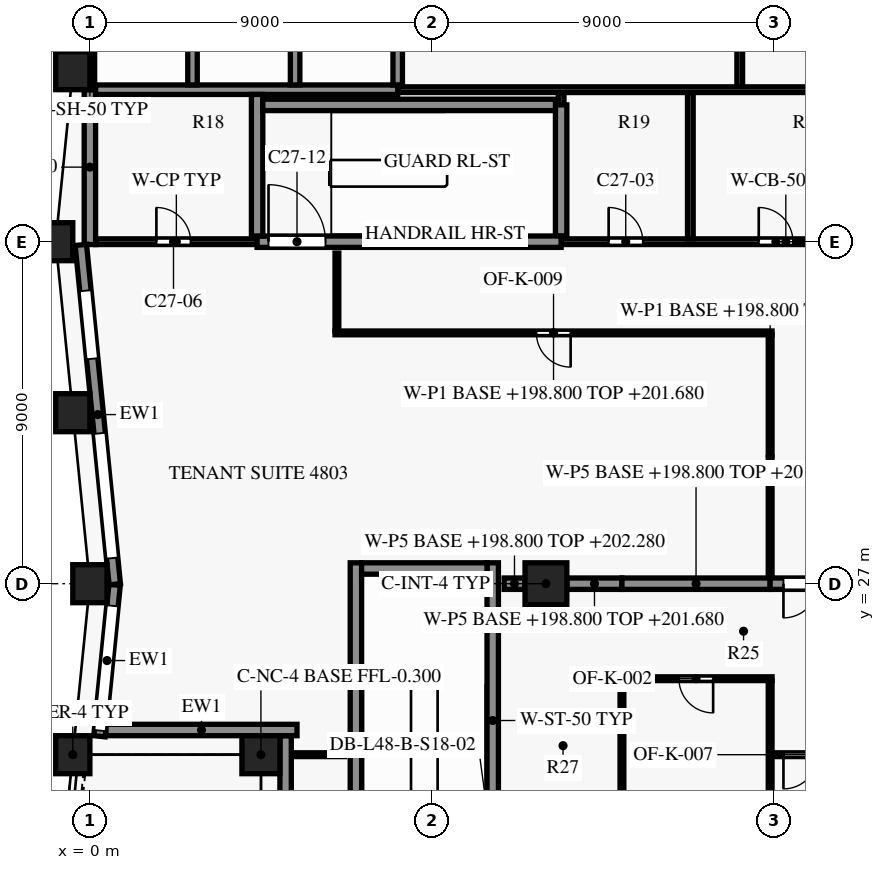
"""IFC4 building model, lengths in metres.
Left out: names, types, materials, properties, quantities, classifications, styles, units other than length and angle.
Written with IfcOpenShell. Run it as: python <this file> out.ifc"""

import sys

from ifc_helpers import new_model, si_unit, direction, frame, frame_2d, origin, origin_2d, place, context, subcontext, project, spatial, rectangle, extrude, element, fill, save


model = new_model("IFC4")
c1 = context("Model", 3, precision=1e-05, world=origin(), true_north=direction((0.0, 1.0)))
c2 = subcontext(c1, "Body", "Model", "MODEL_VIEW")
j1 = project(units=[si_unit("LENGTHUNIT", "METRE"), si_unit("PLANEANGLEUNIT", "RADIAN")], contexts=[c1])
p1 = place(None, origin())
s1 = spatial("IfcSite", under=j1, at=p1, CompositionType="ELEMENT")
p2 = place(p1, origin())
s2 = spatial("IfcBuilding", under=s1, at=p2, CompositionType="ELEMENT")
p3 = place(p2, frame((0.0, 0.0, 198.8)))
s3 = spatial("IfcBuildingStorey", under=s2, at=p3, CompositionType="ELEMENT", Elevation=198.8)
for number, where, z_axis, x_axis in (
    (1, (-0.45, 40.5, 0.0), (0.0, 0.0, 1.0), (-0.1, -0.995, 0.0)),
    (2, (-0.9, 36.0, 0.0), (0.0, 0.0, 1.0), (0.0, -1.0, 0.0)),
    (3, (-0.45, 31.5, 0.0), (0.0, 0.0, 1.0), (0.1, -0.995, 0.0)),
    (4, (0.0, 27.0, 0.0), (0.0, 0.0, 1.0), (0.0, -1.0, 0.0)),
    (5, (-0.45, 22.5, 0.0), (0.0, 0.0, 1.0), (-0.1, -0.995, 0.0)),
):
    element("IfcColumn", number, at=place(p3, frame(where, z_axis=z_axis, x_axis=x_axis)), inside=s3, PredefinedType="COLUMN", context=c2, shape_type="SweptSolid", body=[
        extrude(rectangle(XDim=0.9, YDim=1.0, at=origin_2d()), origin(), (0.0, 0.0, 1.0), 3.8),
    ])
p4 = place(p3, frame((4.5, 22.5, -0.3), z_axis=(0.0, 0.0, 1.0), x_axis=(1.0, 0.0, 0.0)))
e6 = element("IfcColumn", 6, at=p4, inside=s3, PredefinedType="COLUMN", context=c2, shape_type="SweptSolid", body=[
    extrude(rectangle(XDim=1.0, YDim=1.0, at=origin_2d()), origin(), (0.0, 0.0, 1.0), 4.1),
])
p5 = place(p3, frame((12.0, 27.0, 0.0), z_axis=(0.0, 0.0, 1.0), x_axis=(1.0, 0.0, 0.0)))
e7 = element("IfcColumn", 7, at=p5, inside=s3, PredefinedType="COLUMN", context=c2, shape_type="SweptSolid", body=[
    extrude(rectangle(XDim=1.1, YDim=1.1, at=origin_2d()), origin(), (0.0, 0.0, 1.0), 3.8),
])
p6 = place(p3, frame((0.655, 26.985, 0.0), z_axis=(0.0, 0.0, 1.0), x_axis=(-0.099509105781, 0.995036651519, 0.0)))
e8 = element("IfcWall", 8, at=p6, inside=s3, PredefinedType="SOLIDWALL", context=c2, shape_type="SweptSolid", body=[
    extrude(rectangle(XDim=8.975, YDim=0.3, at=frame_2d((4.487, 0.0))), origin(), (0.0, 0.0, 1.0), 3.15),
])
p7 = place(p6, frame((0.691, 0.0, 0.15)))
e9 = element("IfcOpeningElement", 9, at=p7, cuts=e8, PredefinedType="OPENING", context=c2, shape_type="SweptSolid", body=[
    extrude(rectangle(XDim=3.3, YDim=2.4, at=frame_2d((1.65, 1.2))), frame((0.0, 0.16, 0.0), z_axis=(0.0, -1.0, 0.0), x_axis=(1.0, 0.0, 0.0)), (0.0, 0.0, 1.0), 0.32),
])
p8 = place(p6, frame((5.964, 0.0, 0.75)))
e10 = element("IfcOpeningElement", 10, at=p8, cuts=e8, PredefinedType="OPENING", context=c2, shape_type="SweptSolid", body=[
    extrude(rectangle(XDim=1.8, YDim=1.8, at=frame_2d((0.9, 0.9))), frame((0.0, 0.16, 0.0), z_axis=(0.0, -1.0, 0.0), x_axis=(1.0, 0.0, 0.0)), (0.0, 0.0, 1.0), 0.32),
])
p9 = place(p3, frame((0.252, 22.985, 0.0), z_axis=(0.0, 0.0, 1.0), x_axis=(0.09954596771, 0.995032964435, 0.0)))
e11 = element("IfcWall", 11, at=p9, inside=s3, PredefinedType="SOLIDWALL", context=c2, shape_type="SweptSolid", body=[
    extrude(rectangle(XDim=4.005, YDim=0.3, at=frame_2d((2.002, 0.0))), origin(), (0.0, 0.0, 1.0), 3.15),
])
p10 = place(p9, frame((0.15, 0.0, 0.15)))
e12 = element("IfcOpeningElement", 12, at=p10, cuts=e11, PredefinedType="OPENING", context=c2, shape_type="SweptSolid", body=[
    extrude(rectangle(XDim=3.3, YDim=2.4, at=frame_2d((1.65, 1.2))), frame((0.0, 0.16, 0.0), z_axis=(0.0, -1.0, 0.0), x_axis=(1.0, 0.0, 0.0)), (0.0, 0.0, 1.0), 0.32),
])
p11 = place(p3, frame((5.45, 23.15, 0.0), z_axis=(0.0, 0.0, 1.0), x_axis=(-1.0, 0.0, 0.0)))
e13 = element("IfcWall", 13, at=p11, inside=s3, PredefinedType="SOLIDWALL", context=c2, shape_type="SweptSolid", body=[
    extrude(rectangle(XDim=5.026, YDim=0.3, at=frame_2d((2.513, 0.0))), origin(), (0.0, 0.0, 1.0), 3.15),
])
p12 = place(p3, frame((5.15, 18.5, 0.0), z_axis=(0.0, 0.0, 1.0), x_axis=(0.0, 1.0, 0.0)))
e14 = element("IfcWall", 14, at=p12, inside=s3, PredefinedType="SOLIDWALL", context=c2, shape_type="SweptSolid", body=[
    extrude(rectangle(XDim=4.5, YDim=0.3, at=frame_2d((2.25, 0.0))), origin(), (0.0, 0.0, 1.0), 3.15),
])
p13 = place(p3, frame((7.15, 27.4, 0.0), z_axis=(0.0, 0.0, 1.0), x_axis=(1.0, 0.0, 0.0)))
e15 = element("IfcWall", 15, at=p13, inside=s3, PredefinedType="SHEAR", context=c2, shape_type="SweptSolid", body=[
    extrude(rectangle(XDim=3.3, YDim=0.3, at=frame_2d((1.65, 0.0))), origin(), (0.0, 0.0, 1.0), 3.5),
])
p14 = place(p3, frame((0.15, 36.0, 0.0), z_axis=(0.0, 0.0, 1.0), x_axis=(1.0, 0.0, 0.0)))
e16 = element("IfcWall", 16, at=p14, inside=s3, PredefinedType="PARTITIONING", context=c2, shape_type="SweptSolid", body=[
    extrude(rectangle(XDim=4.25, YDim=0.15, at=frame_2d((2.125, 0.0))), origin(), (0.0, 0.0, 1.0), 3.5),
])
p15 = place(p14, frame((1.6, 0.0, 0.0)))
e17 = element("IfcOpeningElement", 17, at=p15, cuts=e16, PredefinedType="OPENING", context=c2, shape_type="SweptSolid", body=[
    extrude(rectangle(XDim=0.9, YDim=2.1, at=frame_2d((0.45, 1.05))), frame((0.0, 0.085, 0.0), z_axis=(0.0, -1.0, 0.0), x_axis=(1.0, 0.0, 0.0)), (0.0, 0.0, 1.0), 0.17),
])
p16 = place(p3, frame((12.4, 36.0, 0.0), z_axis=(0.0, 0.0, 1.0), x_axis=(1.0, 0.0, 0.0)))
e18 = element("IfcWall", 18, at=p16, inside=s3, PredefinedType="SHEAR", context=c2, shape_type="SweptSolid", body=[
    extrude(rectangle(XDim=11.825, YDim=0.15, at=frame_2d((5.913, 0.0))), origin(), (0.0, 0.0, 1.0), 3.5),
])
p17 = place(p16, frame((1.25, 0.0, 0.0)))
e19 = element("IfcOpeningElement", 19, at=p17, cuts=e18, PredefinedType="OPENING", context=c2, shape_type="SweptSolid", body=[
    extrude(rectangle(XDim=0.9, YDim=2.1, at=frame_2d((0.45, 1.05))), frame((0.0, 0.085, 0.0), z_axis=(0.0, -1.0, 0.0), x_axis=(1.0, 0.0, 0.0)), (0.0, 0.0, 1.0), 0.17),
])
p18 = place(p16, frame((5.2, 0.0, 0.0)))
e20 = element("IfcOpeningElement", 20, at=p18, cuts=e18, PredefinedType="OPENING", context=c2, shape_type="SweptSolid", body=[
    extrude(rectangle(XDim=0.9, YDim=2.1, at=frame_2d((0.45, 1.05))), frame((0.0, 0.085, 0.0), z_axis=(0.0, -1.0, 0.0), x_axis=(1.0, 0.0, 0.0)), (0.0, 0.0, 1.0), 0.17),
])
p19 = place(p16, frame((9.425, 0.0, 0.0)))
e21 = element("IfcOpeningElement", 21, at=p19, cuts=e18, PredefinedType="OPENING", context=c2, shape_type="SweptSolid", body=[
    extrude(rectangle(XDim=0.95, YDim=2.1, at=frame_2d((0.475, 1.05))), frame((0.0, 0.085, 0.0), z_axis=(0.0, -1.0, 0.0), x_axis=(1.0, 0.0, 0.0)), (0.0, 0.0, 1.0), 0.17),
])
p20 = place(p3, frame((4.4, 36.0, 0.0), z_axis=(0.0, 0.0, 1.0), x_axis=(1.0, 0.0, 0.0)))
e22 = element("IfcWall", 22, at=p20, inside=s3, PredefinedType="SHEAR", context=c2, shape_type="SweptSolid", body=[
    extrude(rectangle(XDim=8.0, YDim=0.3, at=frame_2d((4.0, 0.0))), origin(), (0.0, 0.0, 1.0), 3.5),
])
p21 = place(p20, frame((0.3, 0.0, 0.0)))
e23 = element("IfcOpeningElement", 23, at=p21, cuts=e22, PredefinedType="OPENING", context=c2, shape_type="SweptSolid", body=[
    extrude(rectangle(XDim=1.5, YDim=2.2, at=frame_2d((0.75, 1.1))), frame((0.0, 0.16, 0.0), z_axis=(0.0, -1.0, 0.0), x_axis=(1.0, 0.0, 0.0)), (0.0, 0.0, 1.0), 0.32),
])
p22 = place(p3, frame((4.55, 39.6, 0.0), z_axis=(0.0, 0.0, 1.0), x_axis=(1.0, 0.0, 0.0)))
e24 = element("IfcWall", 24, at=p22, inside=s3, PredefinedType="SHEAR", context=c2, shape_type="SweptSolid", body=[
    extrude(rectangle(XDim=7.7, YDim=0.3, at=frame_2d((3.85, 0.0))), origin(), (0.0, 0.0, 1.0), 3.5),
])
p23 = place(p3, frame((8.1, 40.0, 0.0), z_axis=(0.0, 0.0, 1.0), x_axis=(1.0, 0.0, 0.0)))
e25 = element("IfcWall", 25, at=p23, inside=s3, PredefinedType="PARTITIONING", context=c2, shape_type="SweptSolid", body=[
    extrude(rectangle(XDim=16.125, YDim=0.15, at=frame_2d((8.062, 0.0))), origin(), (0.0, 0.0, 1.0), 3.5),
])
p24 = place(p3, frame((0.15, 40.0, 0.0), z_axis=(0.0, 0.0, 1.0), x_axis=(1.0, 0.0, 0.0)))
e26 = element("IfcWall", 26, at=p24, inside=s3, PredefinedType="SHEAR", context=c2, shape_type="SweptSolid", body=[
    extrude(rectangle(XDim=7.95, YDim=0.25, at=frame_2d((3.975, 0.0))), origin(), (0.0, 0.0, 1.0), 3.5),
])
p25 = place(p3, frame((0.0, 35.925, 0.0), z_axis=(0.0, 0.0, 1.0), x_axis=(0.0, 1.0, 0.0)))
e27 = element("IfcWall", 27, at=p25, inside=s3, PredefinedType="SHEAR", context=c2, shape_type="SweptSolid", body=[
    extrude(rectangle(XDim=4.075, YDim=0.3, at=frame_2d((2.038, 0.0))), origin(), (0.0, 0.0, 1.0), 3.5),
])
p26 = place(p3, frame((0.0, 40.0, 0.0), z_axis=(0.0, 0.0, 1.0), x_axis=(0.0, 1.0, 0.0)))
e28 = element("IfcWall", 28, at=p26, inside=s3, PredefinedType="SHEAR", context=c2, shape_type="SweptSolid", body=[
    extrude(rectangle(XDim=3.325, YDim=0.25, at=frame_2d((1.663, 0.0))), origin(), (0.0, 0.0, 1.0), 3.5),
])
p27 = place(p3, frame((2.7, 40.125, 0.0), z_axis=(0.0, 0.0, 1.0), x_axis=(0.0, 1.0, 0.0)))
e29 = element("IfcWall", 29, at=p27, inside=s3, PredefinedType="SHEAR", context=c2, shape_type="SweptSolid", body=[
    extrude(rectangle(XDim=2.95, YDim=0.25, at=frame_2d((1.475, 0.0))), origin(), (0.0, 0.0, 1.0), 3.5),
])
p28 = place(p3, frame((4.4, 36.15, 0.0), z_axis=(0.0, 0.0, 1.0), x_axis=(0.0, 1.0, 0.0)))
e30 = element("IfcWall", 30, at=p28, inside=s3, PredefinedType="SHEAR", context=c2, shape_type="SweptSolid", body=[
    extrude(rectangle(XDim=3.725, YDim=0.3, at=frame_2d((1.863, 0.0))), origin(), (0.0, 0.0, 1.0), 3.5),
])
p29 = place(p3, frame((5.4, 40.125, 0.0), z_axis=(0.0, 0.0, 1.0), x_axis=(0.0, 1.0, 0.0)))
e31 = element("IfcWall", 31, at=p29, inside=s3, PredefinedType="SHEAR", context=c2, shape_type="SweptSolid", body=[
    extrude(rectangle(XDim=2.95, YDim=0.25, at=frame_2d((1.475, 0.0))), origin(), (0.0, 0.0, 1.0), 3.5),
])
p30 = place(p3, frame((7.0, 19.25, 0.0), z_axis=(0.0, 0.0, 1.0), x_axis=(0.0, 1.0, 0.0)))
e32 = element("IfcWall", 32, at=p30, inside=s3, PredefinedType="SHEAR", context=c2, shape_type="SweptSolid", body=[
    extrude(rectangle(XDim=8.3, YDim=0.3, at=frame_2d((4.15, 0.0))), origin(), (0.0, 0.0, 1.0), 3.5),
])
p31 = place(p3, frame((8.1, 40.125, 0.0), z_axis=(0.0, 0.0, 1.0), x_axis=(0.0, 1.0, 0.0)))
e33 = element("IfcWall", 33, at=p31, inside=s3, PredefinedType="SHEAR", context=c2, shape_type="SweptSolid", body=[
    extrude(rectangle(XDim=2.95, YDim=0.25, at=frame_2d((1.475, 0.0))), origin(), (0.0, 0.0, 1.0), 3.5),
])
p32 = place(p3, frame((10.6, 19.25, 0.0), z_axis=(0.0, 0.0, 1.0), x_axis=(0.0, 1.0, 0.0)))
e34 = element("IfcWall", 34, at=p32, inside=s3, PredefinedType="SHEAR", context=c2, shape_type="SweptSolid", body=[
    extrude(rectangle(XDim=8.3, YDim=0.3, at=frame_2d((4.15, 0.0))), origin(), (0.0, 0.0, 1.0), 3.5),
])
p33 = place(p32, frame((0.55, 0.0, 0.0)))
e35 = element("IfcOpeningElement", 35, at=p33, cuts=e34, PredefinedType="OPENING", context=c2, shape_type="SweptSolid", body=[
    extrude(rectangle(XDim=1.2, YDim=2.2, at=frame_2d((0.6, 1.1))), frame((0.0, 0.16, 0.0), z_axis=(0.0, -1.0, 0.0), x_axis=(1.0, 0.0, 0.0)), (0.0, 0.0, 1.0), 0.32),
])
p34 = place(p3, frame((12.4, 39.6, 0.0), z_axis=(0.0, 0.0, 1.0), x_axis=(0.0, 1.0, 0.0)))
e36 = element("IfcWall", 36, at=p34, inside=s3, PredefinedType="PARTITIONING", context=c2, shape_type="SweptSolid", body=[
    extrude(rectangle(XDim=0.325, YDim=0.15, at=frame_2d((0.163, 0.0))), origin(), (0.0, 0.0, 1.0), 3.5),
])
p35 = place(p3, frame((12.4, 36.15, 0.0), z_axis=(0.0, 0.0, 1.0), x_axis=(0.0, 1.0, 0.0)))
e37 = element("IfcWall", 37, at=p35, inside=s3, PredefinedType="SHEAR", context=c2, shape_type="SweptSolid", body=[
    extrude(rectangle(XDim=3.45, YDim=0.3, at=frame_2d((1.725, 0.0))), origin(), (0.0, 0.0, 1.0), 3.5),
])
p36 = place(p3, frame((15.8, 36.075, 0.0), z_axis=(0.0, 0.0, 1.0), x_axis=(0.0, 1.0, 0.0)))
e38 = element("IfcWall", 38, at=p36, inside=s3, PredefinedType="PARTITIONING", context=c2, shape_type="SweptSolid", body=[
    extrude(rectangle(XDim=3.85, YDim=0.15, at=frame_2d((1.925, 0.0))), origin(), (0.0, 0.0, 1.0), 3.5),
])
p37 = place(p3, frame((17.1, 40.075, 0.0), z_axis=(0.0, 0.0, 1.0), x_axis=(0.0, 1.0, 0.0)))
e39 = element("IfcWall", 39, at=p37, inside=s3, PredefinedType="PARTITIONING", context=c2, shape_type="SweptSolid", body=[
    extrude(rectangle(XDim=3.05, YDim=0.15, at=frame_2d((1.525, 0.0))), origin(), (0.0, 0.0, 1.0), 3.5),
])
p38 = place(p3, frame((17.9, 22.45, 0.0), z_axis=(0.0, 0.0, 1.0), x_axis=(0.0, -1.0, 0.0)))
e40 = element("IfcWall", 40, at=p38, inside=s3, PredefinedType="PARTITIONING", context=c2, shape_type="SweptSolid", body=[
    extrude(rectangle(XDim=3.93, YDim=0.1, at=frame_2d((1.965, 0.0))), origin(), (0.0, 0.0, 1.0), 3.48),
])
p39 = place(p3, frame((5.35, 22.5, 0.0), z_axis=(0.0, 0.0, 1.0), x_axis=(1.0, 0.0, 0.0)))
e41 = element("IfcWall", 41, at=p39, inside=s3, PredefinedType="PARTITIONING", context=c2, shape_type="SweptSolid", body=[
    extrude(rectangle(XDim=1.35, YDim=0.1, at=frame_2d((0.675, 0.0))), origin(), (0.0, 0.0, 1.0), 3.48),
])
p40 = place(p3, frame((20.4, 22.5, 0.0), z_axis=(0.0, 0.0, 1.0), x_axis=(-1.0, 0.0, 0.0)))
e42 = element("IfcWall", 42, at=p40, inside=s3, PredefinedType="PARTITIONING", context=c2, shape_type="SweptSolid", body=[
    extrude(rectangle(XDim=2.45, YDim=0.1, at=frame_2d((1.225, 0.0))), origin(), (0.0, 0.0, 1.0), 3.48),
])
p41 = place(p40, frame((0.35, 0.0, 0.0)))
e43 = element("IfcOpeningElement", 43, at=p41, cuts=e42, PredefinedType="OPENING", context=c2, shape_type="SweptSolid", body=[
    extrude(rectangle(XDim=1.8, YDim=2.1, at=frame_2d((0.9, 1.05))), frame((0.0, 0.06, 0.0), z_axis=(0.0, -1.0, 0.0), x_axis=(1.0, 0.0, 0.0)), (0.0, 0.0, 1.0), 0.12),
])
p42 = place(p3, frame((17.9, 22.55, 0.0), z_axis=(0.0, 0.0, 1.0), x_axis=(0.0, 1.0, 0.0)))
e44 = element("IfcWall", 44, at=p42, inside=s3, PredefinedType="PARTITIONING", context=c2, shape_type="SweptSolid", body=[
    extrude(rectangle(XDim=1.9, YDim=0.1, at=frame_2d((0.95, 0.0))), origin(), (0.0, 0.0, 1.0), 3.48),
])
p43 = place(p3, frame((14.0, 24.45, 0.0), z_axis=(0.0, 0.0, 1.0), x_axis=(0.0, -1.0, 0.0)))
e45 = element("IfcWall", 45, at=p43, inside=s3, PredefinedType="PARTITIONING", context=c2, shape_type="SweptSolid", body=[
    extrude(rectangle(XDim=5.81, YDim=0.1, at=frame_2d((2.905, 0.0))), origin(), (0.0, 0.0, 1.0), 3.48),
])
p44 = place(p3, frame((17.95, 24.5, 0.0), z_axis=(0.0, 0.0, 1.0), x_axis=(-1.0, 0.0, 0.0)))
e46 = element("IfcWall", 46, at=p44, inside=s3, PredefinedType="PARTITIONING", context=c2, shape_type="SweptSolid", body=[
    extrude(rectangle(XDim=4.0, YDim=0.1, at=frame_2d((2.0, 0.0))), origin(), (0.0, 0.0, 1.0), 3.48),
])
p45 = place(p44, frame((1.55, 0.0, 0.0)))
e47 = element("IfcOpeningElement", 47, at=p45, cuts=e46, PredefinedType="OPENING", context=c2, shape_type="SweptSolid", body=[
    extrude(rectangle(XDim=0.9, YDim=2.1, at=frame_2d((0.45, 1.05))), frame((0.0, 0.06, 0.0), z_axis=(0.0, -1.0, 0.0), x_axis=(1.0, 0.0, 0.0)), (0.0, 0.0, 1.0), 0.12),
])
p46 = place(p3, frame((10.9, 27.0, 0.0), z_axis=(0.0, 0.0, 1.0), x_axis=(1.0, 0.0, 0.0)))
e48 = element("IfcWall", 48, at=p46, inside=s3, PredefinedType="PARTITIONING", context=c2, shape_type="SweptSolid", body=[
    extrude(rectangle(XDim=0.545, YDim=0.3, at=frame_2d((0.272, 0.0))), origin(), (0.0, 0.0, 1.0), 3.48),
])
p47 = place(p3, frame((12.555, 27.0, 0.0), z_axis=(0.0, 0.0, 1.0), x_axis=(1.0, 0.0, 0.0)))
e49 = element("IfcWall", 49, at=p47, inside=s3, PredefinedType="PARTITIONING", context=c2, shape_type="SweptSolid", body=[
    extrude(rectangle(XDim=1.445, YDim=0.3, at=frame_2d((0.723, 0.0))), origin(), (0.0, 0.0, 1.0), 2.88),
])
p48 = place(p3, frame((14.0, 27.0, 0.0), z_axis=(0.0, 0.0, 1.0), x_axis=(1.0, 0.0, 0.0)))
e50 = element("IfcWall", 50, at=p48, inside=s3, PredefinedType="PARTITIONING", context=c2, shape_type="SweptSolid", body=[
    extrude(rectangle(XDim=3.9, YDim=0.3, at=frame_2d((1.95, 0.0))), origin(), (0.0, 0.0, 1.0), 2.88),
])
p49 = place(p3, frame((20.4, 27.0, 0.0), z_axis=(0.0, 0.0, 1.0), x_axis=(-1.0, 0.0, 0.0)))
e51 = element("IfcWall", 51, at=p49, inside=s3, PredefinedType="PARTITIONING", context=c2, shape_type="SweptSolid", body=[
    extrude(rectangle(XDim=2.5, YDim=0.3, at=frame_2d((1.25, 0.0))), origin(), (0.0, 0.0, 1.0), 2.88),
])
p50 = place(p49, frame((0.35, 0.0, 0.0)))
e52 = element("IfcOpeningElement", 52, at=p50, cuts=e51, PredefinedType="OPENING", context=c2, shape_type="SweptSolid", body=[
    extrude(rectangle(XDim=1.8, YDim=2.1, at=frame_2d((0.9, 1.05))), frame((0.0, 0.16, 0.0), z_axis=(0.0, -1.0, 0.0), x_axis=(1.0, 0.0, 0.0)), (0.0, 0.0, 1.0), 0.32),
])
p51 = place(p3, frame((17.9, 27.17, 0.0), z_axis=(0.0, 0.0, 1.0), x_axis=(0.0, 1.0, 0.0)))
e53 = element("IfcWall", 53, at=p51, inside=s3, PredefinedType="PARTITIONING", context=c2, shape_type="SweptSolid", body=[
    extrude(rectangle(XDim=6.38, YDim=0.1, at=frame_2d((3.19, 0.0))), origin(), (0.0, 0.0, 1.0), 2.88),
])
p52 = place(p3, frame((17.95, 33.6, 0.0), z_axis=(0.0, 0.0, 1.0), x_axis=(-1.0, 0.0, 0.0)))
e54 = element("IfcWall", 54, at=p52, inside=s3, PredefinedType="PARTITIONING", context=c2, shape_type="SweptSolid", body=[
    extrude(rectangle(XDim=11.5, YDim=0.1, at=frame_2d((5.75, 0.0))), origin(), (0.0, 0.0, 1.0), 2.88),
])
p53 = place(p52, frame((5.3, 0.0, 0.0)))
e55 = element("IfcOpeningElement", 55, at=p53, cuts=e54, PredefinedType="OPENING", context=c2, shape_type="SweptSolid", body=[
    extrude(rectangle(XDim=0.9, YDim=2.1, at=frame_2d((0.45, 1.05))), frame((0.0, 0.06, 0.0), z_axis=(0.0, -1.0, 0.0), x_axis=(1.0, 0.0, 0.0)), (0.0, 0.0, 1.0), 0.12),
])
p54 = place(p3, frame((6.5, 33.65, 0.0), z_axis=(0.0, 0.0, 1.0), x_axis=(0.0, 1.0, 0.0)))
e56 = element("IfcWall", 56, at=p54, inside=s3, PredefinedType="PARTITIONING", context=c2, shape_type="SweptSolid", body=[
    extrude(rectangle(XDim=2.05, YDim=0.1, at=frame_2d((1.025, 0.0))), origin(), (0.0, 0.0, 1.0), 3.48),
])
p55 = place(p7, origin())
e57 = element("IfcWindow", 57, at=p55, inside=s3, PartitioningType="SINGLE_PANEL", PredefinedType="WINDOW", context=c2, shape_type="SweptSolid", body=[
    extrude(rectangle(XDim=3.3, YDim=2.4, at=frame_2d((1.65, 1.2))), frame((0.0, 0.03, 0.0), z_axis=(0.0, -1.0, 0.0), x_axis=(1.0, 0.0, 0.0)), (0.0, 0.0, 1.0), 0.06),
])
fill(e9, e57)
p56 = place(p8, origin())
e58 = element("IfcWindow", 58, at=p56, inside=s3, PartitioningType="SINGLE_PANEL", PredefinedType="WINDOW", context=c2, shape_type="SweptSolid", body=[
    extrude(rectangle(XDim=1.8, YDim=1.8, at=frame_2d((0.9, 0.9))), frame((0.0, 0.03, 0.0), z_axis=(0.0, -1.0, 0.0), x_axis=(1.0, 0.0, 0.0)), (0.0, 0.0, 1.0), 0.06),
])
fill(e10, e58)
p57 = place(p10, origin())
e59 = element("IfcWindow", 59, at=p57, inside=s3, PartitioningType="SINGLE_PANEL", PredefinedType="WINDOW", context=c2, shape_type="SweptSolid", body=[
    extrude(rectangle(XDim=3.3, YDim=2.4, at=frame_2d((1.65, 1.2))), frame((0.0, 0.03, 0.0), z_axis=(0.0, -1.0, 0.0), x_axis=(1.0, 0.0, 0.0)), (0.0, 0.0, 1.0), 0.06),
])
fill(e12, e59)
p58 = place(p17, origin())
e60 = element("IfcDoor", 60, at=p58, inside=s3, OperationType="SINGLE_SWING_RIGHT", PredefinedType="DOOR", context=c2, shape_type="SweptSolid", body=[
    extrude(rectangle(XDim=0.9, YDim=2.1, at=frame_2d((0.45, 1.05))), frame((0.0, 0.025, 0.0), z_axis=(0.0, -1.0, 0.0), x_axis=(1.0, 0.0, 0.0)), (0.0, 0.0, 1.0), 0.05),
])
fill(e19, e60)
p59 = place(p18, origin())
e61 = element("IfcDoor", 61, at=p59, inside=s3, OperationType="SINGLE_SWING_LEFT", PredefinedType="DOOR", context=c2, shape_type="SweptSolid", body=[
    extrude(rectangle(XDim=0.9, YDim=2.1, at=frame_2d((0.45, 1.05))), frame((0.0, 0.025, 0.0), z_axis=(0.0, -1.0, 0.0), x_axis=(1.0, 0.0, 0.0)), (0.0, 0.0, 1.0), 0.05),
])
fill(e20, e61)
p60 = place(p15, origin())
e62 = element("IfcDoor", 62, at=p60, inside=s3, OperationType="SINGLE_SWING_LEFT", PredefinedType="DOOR", context=c2, shape_type="SweptSolid", body=[
    extrude(rectangle(XDim=0.9, YDim=2.1, at=frame_2d((0.45, 1.05))), frame((0.0, 0.025, 0.0), z_axis=(0.0, -1.0, 0.0), x_axis=(1.0, 0.0, 0.0)), (0.0, 0.0, 1.0), 0.05),
])
fill(e17, e62)
p61 = place(p21, origin())
e63 = element("IfcDoor", 63, at=p61, inside=s3, OperationType="SINGLE_SWING_RIGHT", PredefinedType="DOOR", context=c2, shape_type="SweptSolid", body=[
    extrude(rectangle(XDim=1.5, YDim=2.2, at=frame_2d((0.75, 1.1))), frame((0.0, 0.025, 0.0), z_axis=(0.0, -1.0, 0.0), x_axis=(1.0, 0.0, 0.0)), (0.0, 0.0, 1.0), 0.05),
])
fill(e23, e63)
p62 = place(p45, origin())
e64 = element("IfcDoor", 64, at=p62, inside=s3, OperationType="SINGLE_SWING_RIGHT", PredefinedType="DOOR", context=c2, shape_type="SweptSolid", body=[
    extrude(rectangle(XDim=0.9, YDim=2.1, at=frame_2d((0.45, 1.05))), frame((0.0, 0.025, 0.0), z_axis=(0.0, -1.0, 0.0), x_axis=(1.0, 0.0, 0.0)), (0.0, 0.0, 1.0), 0.05),
])
fill(e47, e64)
p63 = place(p41, origin())
e65 = element("IfcDoor", 65, at=p63, inside=s3, OperationType="DOUBLE_DOOR_SINGLE_SWING", PredefinedType="DOOR", context=c2, shape_type="SweptSolid", body=[
    extrude(rectangle(XDim=1.8, YDim=2.1, at=frame_2d((0.9, 1.05))), frame((0.0, 0.025, 0.0), z_axis=(0.0, -1.0, 0.0), x_axis=(1.0, 0.0, 0.0)), (0.0, 0.0, 1.0), 0.05),
])
fill(e43, e65)
p64 = place(p53, origin())
e66 = element("IfcDoor", 66, at=p64, inside=s3, OperationType="SINGLE_SWING_LEFT", PredefinedType="DOOR", context=c2, shape_type="SweptSolid", body=[
    extrude(rectangle(XDim=0.9, YDim=2.1, at=frame_2d((0.45, 1.05))), frame((0.0, 0.025, 0.0), z_axis=(0.0, -1.0, 0.0), x_axis=(1.0, 0.0, 0.0)), (0.0, 0.0, 1.0), 0.05),
])
fill(e55, e66)
p65 = place(p50, origin())
e67 = element("IfcDoor", 67, at=p65, inside=s3, OperationType="DOUBLE_DOOR_SINGLE_SWING", PredefinedType="DOOR", context=c2, shape_type="SweptSolid", body=[
    extrude(rectangle(XDim=1.8, YDim=2.1, at=frame_2d((0.9, 1.05))), frame((0.0, 0.025, 0.0), z_axis=(0.0, -1.0, 0.0), x_axis=(1.0, 0.0, 0.0)), (0.0, 0.0, 1.0), 0.05),
])
fill(e52, e67)
save(model, sys.argv[1])
